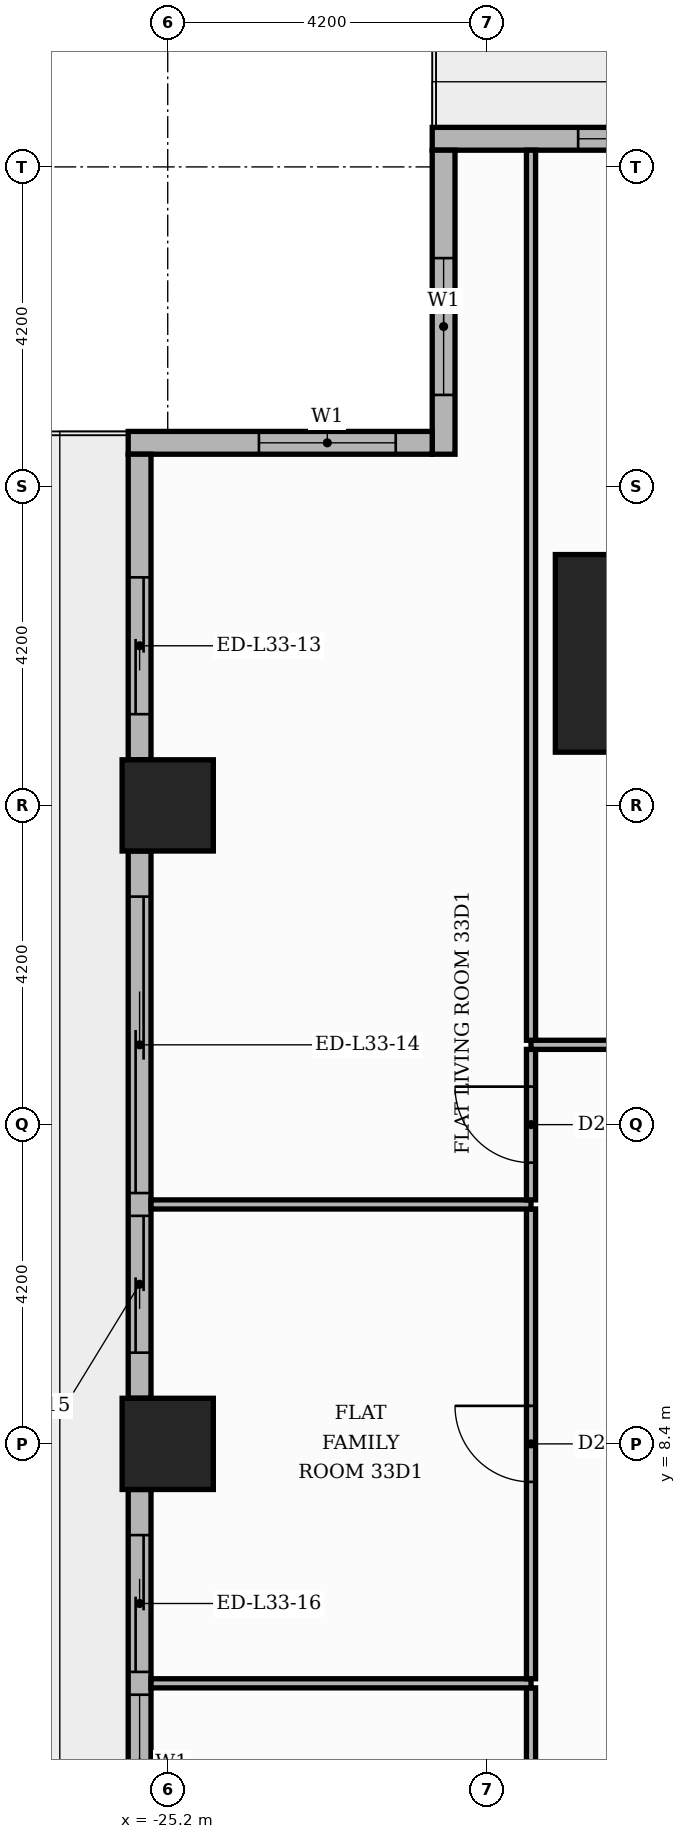
"""IFC4 building model, lengths in metres.
Left out: names, types, materials, properties, quantities, classifications, styles, units other than length and angle.
Written with IfcOpenShell. Run it as: python <this file> out.ifc"""

import sys

from ifc_helpers import new_model, si_unit, direction, frame, frame_2d, origin, origin_2d, place, context, subcontext, project, spatial, rectangle, extrude, element, fill, save


model = new_model("IFC4")
c1 = context("Model", 3, precision=1e-05, world=origin(), true_north=direction((0.0, 1.0)))
c2 = subcontext(c1, "Body", "Model", "MODEL_VIEW")
j1 = project(units=[si_unit("LENGTHUNIT", "METRE"), si_unit("PLANEANGLEUNIT", "RADIAN")], contexts=[c1])
p1 = place(None, origin())
s1 = spatial("IfcSite", under=j1, at=p1, CompositionType="ELEMENT")
p2 = place(p1, origin())
s2 = spatial("IfcBuilding", under=s1, at=p2, CompositionType="ELEMENT")
p3 = place(p2, frame((0.0, 0.0, 141.6)))
s3 = spatial("IfcBuildingStorey", under=s2, at=p3, CompositionType="ELEMENT", Elevation=141.6)
p4 = place(p3, frame((-18.8, 18.8, 0.0), z_axis=(0.0, 0.0, 1.0), x_axis=(1.0, 0.0, 0.0)))
e1 = element("IfcColumn", 1, at=p4, inside=s3, PredefinedType="COLUMN", context=c2, shape_type="SweptSolid", body=[
    extrude(rectangle(XDim=2.6, YDim=2.6, at=origin_2d()), origin(), (0.0, 0.0, 1.0), 3.9),
])
for number, where, z_axis, x_axis in (
    (2, (-25.2, 8.4, 0.0), (0.0, 0.0, 1.0), (1.0, 0.0, 0.0)),
    (3, (-25.2, 16.8, 0.0), (0.0, 0.0, 1.0), (1.0, 0.0, 0.0)),
):
    element("IfcColumn", number, at=place(p3, frame(where, z_axis=z_axis, x_axis=x_axis)), inside=s3, PredefinedType="COLUMN", context=c2, shape_type="SweptSolid", body=[
        extrude(rectangle(XDim=1.2, YDim=1.2, at=origin_2d()), origin(), (0.0, 0.0, 1.0), 3.9),
    ])
p5 = place(p3, frame((-17.4, 25.57, 0.0), z_axis=(0.0, 0.0, 1.0), x_axis=(-1.0, 0.0, 0.0)))
e4 = element("IfcWall", 4, at=p5, inside=s3, PredefinedType="STANDARD", context=c2, shape_type="SweptSolid", body=[
    extrude(rectangle(XDim=4.32, YDim=0.3, at=frame_2d((2.16, 0.0))), origin(), (0.0, 0.0, 1.0), 3.48),
])
p6 = place(p5, frame((0.6, 0.0, 0.9)))
e5 = element("IfcOpeningElement", 5, at=p6, cuts=e4, PredefinedType="OPENING", context=c2, shape_type="SweptSolid", body=[
    extrude(rectangle(XDim=1.8, YDim=2.1, at=frame_2d((0.9, 1.05))), frame((0.0, 0.16, 0.0), z_axis=(0.0, -1.0, 0.0), x_axis=(1.0, 0.0, 0.0)), (0.0, 0.0, 1.0), 0.32),
])
p7 = place(p3, frame((-21.57, 25.42, 0.0), z_axis=(0.0, 0.0, 1.0), x_axis=(0.0, -1.0, 0.0)))
e6 = element("IfcWall", 6, at=p7, inside=s3, PredefinedType="STANDARD", context=c2, shape_type="SweptSolid", body=[
    extrude(rectangle(XDim=4.0, YDim=0.3, at=frame_2d((2.0, 0.0))), origin(), (0.0, 0.0, 1.0), 3.48),
])
p8 = place(p7, frame((1.42, 0.0, 0.9)))
e7 = element("IfcOpeningElement", 7, at=p8, cuts=e6, PredefinedType="OPENING", context=c2, shape_type="SweptSolid", body=[
    extrude(rectangle(XDim=1.8, YDim=2.1, at=frame_2d((0.9, 1.05))), frame((0.0, 0.16, 0.0), z_axis=(0.0, -1.0, 0.0), x_axis=(1.0, 0.0, 0.0)), (0.0, 0.0, 1.0), 0.32),
])
p9 = place(p3, frame((-21.72, 21.57, 0.0), z_axis=(0.0, 0.0, 1.0), x_axis=(-1.0, 0.0, 0.0)))
e8 = element("IfcWall", 8, at=p9, inside=s3, PredefinedType="STANDARD", context=c2, shape_type="SweptSolid", body=[
    extrude(rectangle(XDim=4.0, YDim=0.3, at=frame_2d((2.0, 0.0))), origin(), (0.0, 0.0, 1.0), 3.48),
])
p10 = place(p9, frame((0.48, 0.0, 0.9)))
e9 = element("IfcOpeningElement", 9, at=p10, cuts=e8, PredefinedType="OPENING", context=c2, shape_type="SweptSolid", body=[
    extrude(rectangle(XDim=1.8, YDim=2.1, at=frame_2d((0.9, 1.05))), frame((0.0, 0.16, 0.0), z_axis=(0.0, -1.0, 0.0), x_axis=(1.0, 0.0, 0.0)), (0.0, 0.0, 1.0), 0.32),
])
p11 = place(p3, frame((-25.57, 21.42, 0.0), z_axis=(0.0, 0.0, 1.0), x_axis=(0.0, -1.0, 0.0)))
e10 = element("IfcWall", 10, at=p11, inside=s3, PredefinedType="STANDARD", context=c2, shape_type="SweptSolid", body=[
    extrude(rectangle(XDim=4.02, YDim=0.3, at=frame_2d((2.01, 0.0))), origin(), (0.0, 0.0, 1.0), 3.48),
])
p12 = place(p11, frame((1.62, 0.0, 0.0)))
e11 = element("IfcOpeningElement", 11, at=p12, cuts=e10, PredefinedType="OPENING", context=c2, shape_type="SweptSolid", body=[
    extrude(rectangle(XDim=1.8, YDim=2.4, at=frame_2d((0.9, 1.2))), frame((0.0, 0.16, 0.0), z_axis=(0.0, -1.0, 0.0), x_axis=(1.0, 0.0, 0.0)), (0.0, 0.0, 1.0), 0.32),
])
p13 = place(p3, frame((-25.57, 16.2, 0.0), z_axis=(0.0, 0.0, 1.0), x_axis=(0.0, -1.0, 0.0)))
e12 = element("IfcWall", 12, at=p13, inside=s3, PredefinedType="STANDARD", context=c2, shape_type="SweptSolid", body=[
    extrude(rectangle(XDim=7.2, YDim=0.3, at=frame_2d((3.6, 0.0))), origin(), (0.0, 0.0, 1.0), 3.48),
])
p14 = place(p13, frame((0.6, 0.0, 0.0)))
e13 = element("IfcOpeningElement", 13, at=p14, cuts=e12, PredefinedType="OPENING", context=c2, shape_type="SweptSolid", body=[
    extrude(rectangle(XDim=3.9, YDim=2.4, at=frame_2d((1.95, 1.2))), frame((0.0, 0.16, 0.0), z_axis=(0.0, -1.0, 0.0), x_axis=(1.0, 0.0, 0.0)), (0.0, 0.0, 1.0), 0.32),
])
p15 = place(p13, frame((4.8, 0.0, 0.0)))
e14 = element("IfcOpeningElement", 14, at=p15, cuts=e12, PredefinedType="OPENING", context=c2, shape_type="SweptSolid", body=[
    extrude(rectangle(XDim=1.8, YDim=2.4, at=frame_2d((0.9, 1.2))), frame((0.0, 0.16, 0.0), z_axis=(0.0, -1.0, 0.0), x_axis=(1.0, 0.0, 0.0)), (0.0, 0.0, 1.0), 0.32),
])
p16 = place(p3, frame((-25.57, 7.8, 0.0), z_axis=(0.0, 0.0, 1.0), x_axis=(0.0, -1.0, 0.0)))
e15 = element("IfcWall", 15, at=p16, inside=s3, PredefinedType="STANDARD", context=c2, shape_type="SweptSolid", body=[
    extrude(rectangle(XDim=7.2, YDim=0.3, at=frame_2d((3.6, 0.0))), origin(), (0.0, 0.0, 1.0), 3.48),
])
p17 = place(p16, frame((0.6, 0.0, 0.0)))
e16 = element("IfcOpeningElement", 16, at=p17, cuts=e15, PredefinedType="OPENING", context=c2, shape_type="SweptSolid", body=[
    extrude(rectangle(XDim=1.8, YDim=2.4, at=frame_2d((0.9, 1.2))), frame((0.0, 0.16, 0.0), z_axis=(0.0, -1.0, 0.0), x_axis=(1.0, 0.0, 0.0)), (0.0, 0.0, 1.0), 0.32),
])
p18 = place(p16, frame((2.7, 0.0, 0.9)))
e17 = element("IfcOpeningElement", 17, at=p18, cuts=e15, PredefinedType="OPENING", context=c2, shape_type="SweptSolid", body=[
    extrude(rectangle(XDim=1.8, YDim=2.1, at=frame_2d((0.9, 1.05))), frame((0.0, 0.16, 0.0), z_axis=(0.0, -1.0, 0.0), x_axis=(1.0, 0.0, 0.0)), (0.0, 0.0, 1.0), 0.32),
])
p19 = place(p16, frame((4.8, 0.0, 0.0)))
e18 = element("IfcOpeningElement", 18, at=p19, cuts=e15, PredefinedType="OPENING", context=c2, shape_type="SweptSolid", body=[
    extrude(rectangle(XDim=1.8, YDim=2.4, at=frame_2d((0.9, 1.2))), frame((0.0, 0.16, 0.0), z_axis=(0.0, -1.0, 0.0), x_axis=(1.0, 0.0, 0.0)), (0.0, 0.0, 1.0), 0.32),
])
p20 = place(p3, frame((-20.42, -3.09, 0.0), z_axis=(0.0, 0.0, 1.0), x_axis=(0.0, 1.0, 0.0)))
e19 = element("IfcWall", 19, at=p20, inside=s3, PredefinedType="PARTITIONING", context=c2, shape_type="SweptSolid", body=[
    extrude(rectangle(XDim=8.28, YDim=0.12, at=frame_2d((4.14, 0.0))), origin(), (0.0, 0.0, 1.0), 3.48),
])
p21 = place(p20, frame((3.69, 0.0, 0.0)))
e20 = element("IfcOpeningElement", 20, at=p21, cuts=e19, PredefinedType="OPENING", context=c2, shape_type="SweptSolid", body=[
    extrude(rectangle(XDim=0.9, YDim=2.1, at=frame_2d((0.45, 1.05))), frame((0.0, 0.07, 0.0), z_axis=(0.0, -1.0, 0.0), x_axis=(1.0, 0.0, 0.0)), (0.0, 0.0, 1.0), 0.14),
])
p22 = place(p3, frame((-25.42, 5.25, 0.0), z_axis=(0.0, 0.0, 1.0), x_axis=(1.0, 0.0, 0.0)))
e21 = element("IfcWall", 21, at=p22, inside=s3, PredefinedType="PARTITIONING", context=c2, shape_type="SweptSolid", body=[
    extrude(rectangle(XDim=5.0, YDim=0.12, at=frame_2d((2.5, 0.0))), origin(), (0.0, 0.0, 1.0), 3.48),
])
p23 = place(p3, frame((-20.42, 5.31, 0.0), z_axis=(0.0, 0.0, 1.0), x_axis=(0.0, 1.0, 0.0)))
e22 = element("IfcWall", 22, at=p23, inside=s3, PredefinedType="PARTITIONING", context=c2, shape_type="SweptSolid", body=[
    extrude(rectangle(XDim=6.18, YDim=0.12, at=frame_2d((3.09, 0.0))), origin(), (0.0, 0.0, 1.0), 3.48),
])
p24 = place(p23, frame((2.59, 0.0, 0.0)))
e23 = element("IfcOpeningElement", 23, at=p24, cuts=e22, PredefinedType="OPENING", context=c2, shape_type="SweptSolid", body=[
    extrude(rectangle(XDim=1.0, YDim=2.1, at=frame_2d((0.5, 1.05))), frame((0.0, 0.07, 0.0), z_axis=(0.0, -1.0, 0.0), x_axis=(1.0, 0.0, 0.0)), (0.0, 0.0, 1.0), 0.14),
])
p25 = place(p3, frame((-25.42, 11.55, 0.0), z_axis=(0.0, 0.0, 1.0), x_axis=(1.0, 0.0, 0.0)))
e24 = element("IfcWall", 24, at=p25, inside=s3, PredefinedType="PARTITIONING", context=c2, shape_type="SweptSolid", body=[
    extrude(rectangle(XDim=5.0, YDim=0.12, at=frame_2d((2.5, 0.0))), origin(), (0.0, 0.0, 1.0), 3.48),
])
p26 = place(p3, frame((-20.42, 11.61, 0.0), z_axis=(0.0, 0.0, 1.0), x_axis=(0.0, 1.0, 0.0)))
e25 = element("IfcWall", 25, at=p26, inside=s3, PredefinedType="PARTITIONING", context=c2, shape_type="SweptSolid", body=[
    extrude(rectangle(XDim=1.98, YDim=0.12, at=frame_2d((0.99, 0.0))), origin(), (0.0, 0.0, 1.0), 3.48),
])
p27 = place(p26, frame((0.49, 0.0, 0.0)))
e26 = element("IfcOpeningElement", 26, at=p27, cuts=e25, PredefinedType="OPENING", context=c2, shape_type="SweptSolid", body=[
    extrude(rectangle(XDim=1.0, YDim=2.1, at=frame_2d((0.5, 1.05))), frame((0.0, 0.07, 0.0), z_axis=(0.0, -1.0, 0.0), x_axis=(1.0, 0.0, 0.0)), (0.0, 0.0, 1.0), 0.14),
])
p28 = place(p3, frame((-20.42, 13.65, 0.0), z_axis=(0.0, 0.0, 1.0), x_axis=(1.0, 0.0, 0.0)))
e27 = element("IfcWall", 27, at=p28, inside=s3, PredefinedType="PARTITIONING", context=c2, shape_type="SweptSolid", body=[
    extrude(rectangle(XDim=6.77, YDim=0.12, at=frame_2d((3.385, 0.0))), origin(), (0.0, 0.0, 1.0), 3.48),
])
p29 = place(p28, frame((2.935, 0.0, 0.0)))
e28 = element("IfcOpeningElement", 28, at=p29, cuts=e27, PredefinedType="OPENING", context=c2, shape_type="SweptSolid", body=[
    extrude(rectangle(XDim=0.9, YDim=2.1, at=frame_2d((0.45, 1.05))), frame((0.0, 0.07, 0.0), z_axis=(0.0, -1.0, 0.0), x_axis=(1.0, 0.0, 0.0)), (0.0, 0.0, 1.0), 0.14),
])
p30 = place(p3, frame((-20.42, 13.71, 0.0), z_axis=(0.0, 0.0, 1.0), x_axis=(0.0, 1.0, 0.0)))
e29 = element("IfcWall", 29, at=p30, inside=s3, PredefinedType="PARTITIONING", context=c2, shape_type="SweptSolid", body=[
    extrude(rectangle(XDim=11.71, YDim=0.12, at=frame_2d((5.855, 0.0))), origin(), (0.0, 0.0, 1.0), 3.48),
])
p31 = place(p6, origin())
e30 = element("IfcWindow", 30, at=p31, inside=s3, PartitioningType="SINGLE_PANEL", PredefinedType="WINDOW", context=c2, shape_type="SweptSolid", body=[
    extrude(rectangle(XDim=1.8, YDim=2.1, at=frame_2d((0.9, 1.05))), frame((0.0, 0.03, 0.0), z_axis=(0.0, -1.0, 0.0), x_axis=(1.0, 0.0, 0.0)), (0.0, 0.0, 1.0), 0.06),
])
fill(e5, e30)
p32 = place(p8, origin())
e31 = element("IfcWindow", 31, at=p32, inside=s3, PartitioningType="SINGLE_PANEL", PredefinedType="WINDOW", context=c2, shape_type="SweptSolid", body=[
    extrude(rectangle(XDim=1.8, YDim=2.1, at=frame_2d((0.9, 1.05))), frame((0.0, 0.03, 0.0), z_axis=(0.0, -1.0, 0.0), x_axis=(1.0, 0.0, 0.0)), (0.0, 0.0, 1.0), 0.06),
])
fill(e7, e31)
p33 = place(p10, origin())
e32 = element("IfcWindow", 32, at=p33, inside=s3, PartitioningType="SINGLE_PANEL", PredefinedType="WINDOW", context=c2, shape_type="SweptSolid", body=[
    extrude(rectangle(XDim=1.8, YDim=2.1, at=frame_2d((0.9, 1.05))), frame((0.0, 0.03, 0.0), z_axis=(0.0, -1.0, 0.0), x_axis=(1.0, 0.0, 0.0)), (0.0, 0.0, 1.0), 0.06),
])
fill(e9, e32)
p34 = place(p12, origin())
e33 = element("IfcDoor", 33, at=p34, inside=s3, OperationType="SLIDING_TO_RIGHT", PredefinedType="DOOR", context=c2, shape_type="SweptSolid", body=[
    extrude(rectangle(XDim=1.8, YDim=2.4, at=frame_2d((0.9, 1.2))), frame((0.0, 0.025, 0.0), z_axis=(0.0, -1.0, 0.0), x_axis=(1.0, 0.0, 0.0)), (0.0, 0.0, 1.0), 0.05),
])
fill(e11, e33)
p35 = place(p14, origin())
e34 = element("IfcDoor", 34, at=p35, inside=s3, OperationType="SLIDING_TO_LEFT", PredefinedType="DOOR", context=c2, shape_type="SweptSolid", body=[
    extrude(rectangle(XDim=3.9, YDim=2.4, at=frame_2d((1.95, 1.2))), frame((0.0, 0.025, 0.0), z_axis=(0.0, -1.0, 0.0), x_axis=(1.0, 0.0, 0.0)), (0.0, 0.0, 1.0), 0.05),
])
fill(e13, e34)
p36 = place(p15, origin())
e35 = element("IfcDoor", 35, at=p36, inside=s3, OperationType="SLIDING_TO_RIGHT", PredefinedType="DOOR", context=c2, shape_type="SweptSolid", body=[
    extrude(rectangle(XDim=1.8, YDim=2.4, at=frame_2d((0.9, 1.2))), frame((0.0, 0.025, 0.0), z_axis=(0.0, -1.0, 0.0), x_axis=(1.0, 0.0, 0.0)), (0.0, 0.0, 1.0), 0.05),
])
fill(e14, e35)
p37 = place(p17, origin())
e36 = element("IfcDoor", 36, at=p37, inside=s3, OperationType="SLIDING_TO_LEFT", PredefinedType="DOOR", context=c2, shape_type="SweptSolid", body=[
    extrude(rectangle(XDim=1.8, YDim=2.4, at=frame_2d((0.9, 1.2))), frame((0.0, 0.025, 0.0), z_axis=(0.0, -1.0, 0.0), x_axis=(1.0, 0.0, 0.0)), (0.0, 0.0, 1.0), 0.05),
])
fill(e16, e36)
p38 = place(p18, origin())
e37 = element("IfcWindow", 37, at=p38, inside=s3, PartitioningType="SINGLE_PANEL", PredefinedType="WINDOW", context=c2, shape_type="SweptSolid", body=[
    extrude(rectangle(XDim=1.8, YDim=2.1, at=frame_2d((0.9, 1.05))), frame((0.0, 0.03, 0.0), z_axis=(0.0, -1.0, 0.0), x_axis=(1.0, 0.0, 0.0)), (0.0, 0.0, 1.0), 0.06),
])
fill(e17, e37)
p39 = place(p27, origin())
e38 = element("IfcDoor", 38, at=p39, inside=s3, OperationType="SINGLE_SWING_RIGHT", PredefinedType="DOOR", context=c2, shape_type="SweptSolid", body=[
    extrude(rectangle(XDim=1.0, YDim=2.1, at=frame_2d((0.5, 1.05))), frame((0.0, 0.025, 0.0), z_axis=(0.0, -1.0, 0.0), x_axis=(1.0, 0.0, 0.0)), (0.0, 0.0, 1.0), 0.05),
])
fill(e26, e38)
p40 = place(p24, origin())
e39 = element("IfcDoor", 39, at=p40, inside=s3, OperationType="SINGLE_SWING_RIGHT", PredefinedType="DOOR", context=c2, shape_type="SweptSolid", body=[
    extrude(rectangle(XDim=1.0, YDim=2.1, at=frame_2d((0.5, 1.05))), frame((0.0, 0.025, 0.0), z_axis=(0.0, -1.0, 0.0), x_axis=(1.0, 0.0, 0.0)), (0.0, 0.0, 1.0), 0.05),
])
fill(e23, e39)
save(model, sys.argv[1])
